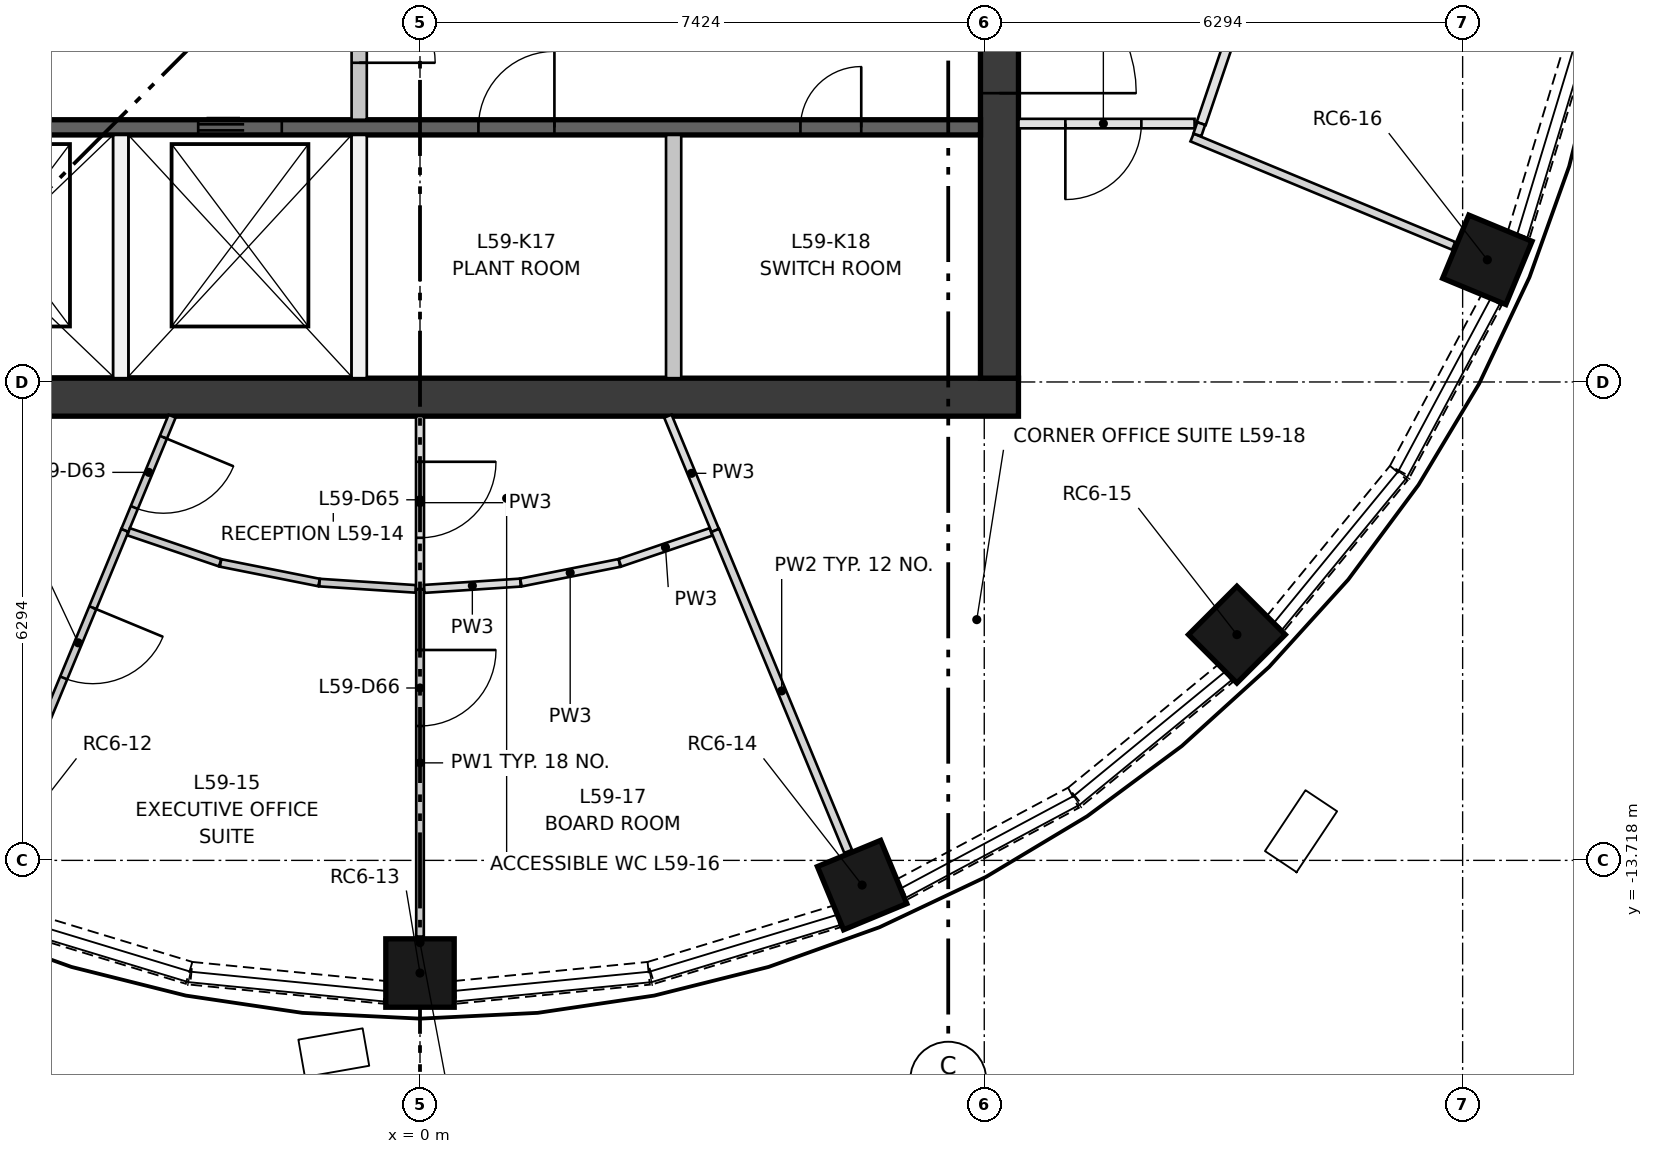
"""IFC4 building model, lengths in metres.
Left out: names, types, materials, properties, quantities, classifications, styles, units other than length and angle.
Written with IfcOpenShell. Run it as: python <this file> out.ifc"""

import sys

from ifc_helpers import new_model, si_unit, direction, frame, frame_2d, origin, origin_2d, place, context, subcontext, project, spatial, rectangle, extrude, element, fill, save


model = new_model("IFC4")
c1 = context("Model", 3, precision=1e-05, world=origin(), true_north=direction((0.0, 1.0)))
c2 = subcontext(c1, "Body", "Model", "MODEL_VIEW")
j1 = project(units=[si_unit("LENGTHUNIT", "METRE"), si_unit("PLANEANGLEUNIT", "RADIAN")], contexts=[c1])
p1 = place(None, origin())
s1 = spatial("IfcSite", under=j1, at=p1, CompositionType="ELEMENT")
p2 = place(p1, origin())
s2 = spatial("IfcBuilding", under=s1, at=p2, CompositionType="ELEMENT")
p3 = place(p2, frame((0.0, 0.0, 217.8)))
s3 = spatial("IfcBuildingStorey", under=s2, at=p3, CompositionType="ELEMENT", Elevation=217.8)
for number, where, z_axis, x_axis in (
    (1, (0.0, -15.2, 0.5), (0.0, 0.0, 1.0), (0.0, -1.0, 0.0)),
    (2, (5.817, -14.043, 0.5), (0.0, 0.0, 1.0), (0.383, -0.924, 0.0)),
    (3, (10.748, -10.748, 0.5), (0.0, 0.0, 1.0), (0.707, -0.707, 0.0)),
    (4, (14.043, -5.817, 0.5), (0.0, 0.0, 1.0), (0.924, -0.383, 0.0)),
):
    element("IfcColumn", number, at=place(p3, frame(where, z_axis=z_axis, x_axis=x_axis)), inside=s3, PredefinedType="COLUMN", context=c2, shape_type="SweptSolid", body=[
        extrude(rectangle(XDim=0.9, YDim=0.9, at=origin_2d()), origin(), (0.0, 0.0, 1.0), 2.85),
    ])
p4 = place(p3, frame((-7.874, -7.624, 0.0), z_axis=(0.0, 0.0, 1.0), x_axis=(1.0, 0.0, 0.0)))
e5 = element("IfcWall", 5, at=p4, inside=s3, PredefinedType="SHEAR", context=c2, shape_type="SweptSolid", body=[
    extrude(rectangle(XDim=15.748, YDim=0.5, at=frame_2d((7.874, 0.0))), origin(), (0.0, 0.0, 1.0), 3.35),
])
p5 = place(p3, frame((7.624, -7.374, 0.0), z_axis=(0.0, 0.0, 1.0), x_axis=(0.0, 1.0, 0.0)))
e6 = element("IfcWall", 6, at=p5, inside=s3, PredefinedType="SHEAR", context=c2, shape_type="SweptSolid", body=[
    extrude(rectangle(XDim=14.748, YDim=0.5, at=frame_2d((7.374, 0.0))), origin(), (0.0, 0.0, 1.0), 3.35),
])
p6 = place(p5, frame((6.874, 0.0, 0.0)))
e7 = element("IfcOpeningElement", 7, at=p6, cuts=e6, PredefinedType="OPENING", context=c2, shape_type="SweptSolid", body=[
    extrude(rectangle(XDim=1.0, YDim=2.1, at=frame_2d((0.5, 1.05))), frame((0.0, 0.26, 0.0), z_axis=(0.0, -1.0, 0.0), x_axis=(1.0, 0.0, 0.0)), (0.0, 0.0, 1.0), 0.52),
])
p7 = place(p5, frame((3.75, 0.0, 0.0)))
e8 = element("IfcOpeningElement", 8, at=p7, cuts=e6, PredefinedType="OPENING", context=c2, shape_type="SweptSolid", body=[
    extrude(rectangle(XDim=1.8, YDim=2.1, at=frame_2d((0.9, 1.05))), frame((0.0, 0.26, 0.0), z_axis=(0.0, -1.0, 0.0), x_axis=(1.0, 0.0, 0.0)), (0.0, 0.0, 1.0), 0.52),
])
p8 = place(p5, frame((9.198, 0.0, 0.0)))
e9 = element("IfcOpeningElement", 9, at=p8, cuts=e6, PredefinedType="OPENING", context=c2, shape_type="SweptSolid", body=[
    extrude(rectangle(XDim=1.8, YDim=2.1, at=frame_2d((0.9, 1.05))), frame((0.0, 0.26, 0.0), z_axis=(0.0, -1.0, 0.0), x_axis=(1.0, 0.0, 0.0)), (0.0, 0.0, 1.0), 0.52),
])
p9 = place(p3, frame((-7.374, -4.074, 0.0), z_axis=(0.0, 0.0, 1.0), x_axis=(1.0, 0.0, 0.0)))
e10 = element("IfcWall", 10, at=p9, inside=s3, PredefinedType="SHEAR", context=c2, shape_type="SweptSolid", body=[
    extrude(rectangle(XDim=14.748, YDim=0.2, at=frame_2d((7.374, 0.0))), origin(), (0.0, 0.0, 1.0), 3.0),
])
p10 = place(p9, frame((1.319, 0.0, 0.0)))
e11 = element("IfcOpeningElement", 11, at=p10, cuts=e10, PredefinedType="OPENING", context=c2, shape_type="SweptSolid", body=[
    extrude(rectangle(XDim=1.1, YDim=2.1, at=frame_2d((0.55, 1.05))), frame((0.0, 0.11, 0.0), z_axis=(0.0, -1.0, 0.0), x_axis=(1.0, 0.0, 0.0)), (0.0, 0.0, 1.0), 0.22),
])
p11 = place(p9, frame((4.456, 0.0, 0.0)))
e12 = element("IfcOpeningElement", 12, at=p11, cuts=e10, PredefinedType="OPENING", context=c2, shape_type="SweptSolid", body=[
    extrude(rectangle(XDim=1.1, YDim=2.1, at=frame_2d((0.55, 1.05))), frame((0.0, 0.11, 0.0), z_axis=(0.0, -1.0, 0.0), x_axis=(1.0, 0.0, 0.0)), (0.0, 0.0, 1.0), 0.22),
])
p12 = place(p9, frame((8.143, 0.0, 0.0)))
e13 = element("IfcOpeningElement", 13, at=p12, cuts=e10, PredefinedType="OPENING", context=c2, shape_type="SweptSolid", body=[
    extrude(rectangle(XDim=1.0, YDim=2.1, at=frame_2d((0.5, 1.05))), frame((0.0, 0.11, 0.0), z_axis=(0.0, -1.0, 0.0), x_axis=(1.0, 0.0, 0.0)), (0.0, 0.0, 1.0), 0.22),
])
p13 = place(p9, frame((12.379, 0.0, 0.0)))
e14 = element("IfcOpeningElement", 14, at=p13, cuts=e10, PredefinedType="OPENING", context=c2, shape_type="SweptSolid", body=[
    extrude(rectangle(XDim=0.8, YDim=2.1, at=frame_2d((0.4, 1.05))), frame((0.0, 0.11, 0.0), z_axis=(0.0, -1.0, 0.0), x_axis=(1.0, 0.0, 0.0)), (0.0, 0.0, 1.0), 0.22),
])
for number, where, z_axis, x_axis in (
    (15, (-3.937, -7.374, 0.0), (0.0, 0.0, 1.0), (0.0, 1.0, 0.0)),
    (16, (-0.8, -7.374, 0.0), (0.0, 0.0, 1.0), (0.0, 1.0, 0.0)),
):
    element("IfcWall", number, at=place(p3, frame(where, z_axis=z_axis, x_axis=x_axis)), inside=s3, PredefinedType="PARTITIONING", context=c2, shape_type="SweptSolid", body=[
        extrude(rectangle(XDim=3.2, YDim=0.2, at=frame_2d((1.6, 0.0))), origin(), (0.0, 0.0, 1.0), 3.0),
    ])
p14 = place(p3, frame((-0.8, -3.974, 0.0), z_axis=(0.0, 0.0, 1.0), x_axis=(0.0, 1.0, 0.0)))
e17 = element("IfcWall", 17, at=p14, inside=s3, PredefinedType="PARTITIONING", context=c2, shape_type="SweptSolid", body=[
    extrude(rectangle(XDim=2.499, YDim=0.2, at=frame_2d((1.25, 0.0))), origin(), (0.0, 0.0, 1.0), 3.0),
])
p15 = place(p14, frame((0.75, 0.0, 0.0)))
e18 = element("IfcOpeningElement", 18, at=p15, cuts=e17, PredefinedType="OPENING", context=c2, shape_type="SweptSolid", body=[
    extrude(rectangle(XDim=1.0, YDim=2.1, at=frame_2d((0.5, 1.05))), frame((0.0, 0.11, 0.0), z_axis=(0.0, -1.0, 0.0), x_axis=(1.0, 0.0, 0.0)), (0.0, 0.0, 1.0), 0.22),
])
p16 = place(p3, frame((3.337, -7.374, 0.0), z_axis=(0.0, 0.0, 1.0), x_axis=(0.0, 1.0, 0.0)))
e19 = element("IfcWall", 19, at=p16, inside=s3, PredefinedType="PARTITIONING", context=c2, shape_type="SweptSolid", body=[
    extrude(rectangle(XDim=3.2, YDim=0.2, at=frame_2d((1.6, 0.0))), origin(), (0.0, 0.0, 1.0), 3.0),
])
p17 = place(p3, frame((-5.486, -14.455, 0.0), z_axis=(0.0, 0.0, 1.0), x_axis=(0.956960147557, -0.290219358397, 0.0)))
e20 = element("IfcWall", 20, at=p17, inside=s3, PredefinedType="SOLIDWALL", context=c2, shape_type="SweptSolid", body=[
    extrude(rectangle(XDim=2.557, YDim=0.3, at=frame_2d((1.279, 0.0))), origin(), (0.0, 0.0, 1.0), 0.9),
])
for number, where, z_axis, x_axis in (
    (21, (-3.009, -15.204, 0.0), (0.0, 0.0, 1.0), (0.995, -0.098, 0.0)),
    (22, (0.464, -15.455, 0.0), (0.0, 0.0, 1.0), (0.995, 0.098, 0.0)),
):
    element("IfcWall", number, at=place(p3, frame(where, z_axis=z_axis, x_axis=x_axis)), inside=s3, PredefinedType="SOLIDWALL", context=c2, shape_type="SweptSolid", body=[
        extrude(rectangle(XDim=2.558, YDim=0.3, at=frame_2d((1.279, 0.0))), origin(), (0.0, 0.0, 1.0), 0.9),
    ])
p18 = place(p3, frame((3.038, -15.198, 0.0), z_axis=(0.0, 0.0, 1.0), x_axis=(0.956960147557, 0.290219358397, 0.0)))
e23 = element("IfcWall", 23, at=p18, inside=s3, PredefinedType="SOLIDWALL", context=c2, shape_type="SweptSolid", body=[
    extrude(rectangle(XDim=2.557, YDim=0.3, at=frame_2d((1.279, 0.0))), origin(), (0.0, 0.0, 1.0), 0.9),
])
p19 = place(p3, frame((6.343, -14.1, 0.0), z_axis=(0.0, 0.0, 1.0), x_axis=(0.881810499649, 0.471603904468, 0.0)))
e24 = element("IfcWall", 24, at=p19, inside=s3, PredefinedType="SOLIDWALL", context=c2, shape_type="SweptSolid", body=[
    extrude(rectangle(XDim=2.557, YDim=0.3, at=frame_2d((1.278, 0.0))), origin(), (0.0, 0.0, 1.0), 0.9),
])
for number, where, z_axis, x_axis in (
    (25, (8.623, -12.877, 0.0), (0.0, 0.0, 1.0), (0.773, 0.634, 0.0)),
    (26, (11.256, -10.6, 0.0), (0.0, 0.0, 1.0), (0.634, 0.773, 0.0)),
):
    element("IfcWall", number, at=place(p3, frame(where, z_axis=z_axis, x_axis=x_axis)), inside=s3, PredefinedType="SOLIDWALL", context=c2, shape_type="SweptSolid", body=[
        extrude(rectangle(XDim=2.558, YDim=0.3, at=frame_2d((1.279, 0.0))), origin(), (0.0, 0.0, 1.0), 0.9),
    ])
p20 = place(p3, frame((12.894, -8.598, 0.0), z_axis=(0.0, 0.0, 1.0), x_axis=(0.471603904468, 0.881810499649, 0.0)))
e27 = element("IfcWall", 27, at=p20, inside=s3, PredefinedType="SOLIDWALL", context=c2, shape_type="SweptSolid", body=[
    extrude(rectangle(XDim=2.557, YDim=0.3, at=frame_2d((1.278, 0.0))), origin(), (0.0, 0.0, 1.0), 0.9),
])
p21 = place(p3, frame((14.455, -5.486, 0.0), z_axis=(0.0, 0.0, 1.0), x_axis=(0.290219358397, 0.956960147557, 0.0)))
e28 = element("IfcWall", 28, at=p21, inside=s3, PredefinedType="SOLIDWALL", context=c2, shape_type="SweptSolid", body=[
    extrude(rectangle(XDim=2.557, YDim=0.3, at=frame_2d((1.279, 0.0))), origin(), (0.0, 0.0, 1.0), 0.9),
])
p22 = place(p3, frame((10.191, -4.024, 0.0), z_axis=(0.0, 0.0, 1.0), x_axis=(-1.0, 0.0, 0.0)))
e29 = element("IfcWall", 29, at=p22, inside=s3, PredefinedType="PARTITIONING", context=c2, shape_type="SweptSolid", body=[
    extrude(rectangle(XDim=2.317, YDim=0.125, at=frame_2d((1.158, 0.0))), origin(), (0.0, 0.0, 1.0), 3.0),
])
p23 = place(p22, frame((0.7, 0.0, 0.0)))
e30 = element("IfcOpeningElement", 30, at=p23, cuts=e29, PredefinedType="OPENING", context=c2, shape_type="SweptSolid", body=[
    extrude(rectangle(XDim=1.0, YDim=2.1, at=frame_2d((0.5, 1.05))), frame((0.0, 0.073, 0.0), z_axis=(0.0, -1.0, 0.0), x_axis=(1.0, 0.0, 0.0)), (0.0, 0.0, 1.0), 0.145),
])
p24 = place(p3, frame((10.672, -2.864, 0.0), z_axis=(0.0, 0.0, 1.0), x_axis=(-0.321363343769, -0.946955965862, 0.0)))
e31 = element("IfcWall", 31, at=p24, inside=s3, PredefinedType="PARTITIONING", context=c2, shape_type="SweptSolid", body=[
    extrude(rectangle(XDim=1.225, YDim=0.125, at=frame_2d((0.613, 0.0))), origin(), (0.0, 0.0, 1.0), 3.0),
])
p25 = place(p3, frame((-3.261, -7.874, 0.0), z_axis=(0.0, 0.0, 1.0), x_axis=(-0.382718376354, -0.923865057463, 0.0)))
e32 = element("IfcWall", 32, at=p25, inside=s3, PredefinedType="PARTITIONING", context=c2, shape_type="SweptSolid", body=[
    extrude(rectangle(XDim=1.627, YDim=0.1, at=frame_2d((0.813, 0.0))), origin(), (0.0, 0.0, 1.0), 3.0),
])
p26 = place(p25, frame((0.3, 0.0, 0.0)))
e33 = element("IfcOpeningElement", 33, at=p26, cuts=e32, PredefinedType="OPENING", context=c2, shape_type="SweptSolid", body=[
    extrude(rectangle(XDim=1.0, YDim=2.1, at=frame_2d((0.5, 1.05))), frame((0.0, 0.06, 0.0), z_axis=(0.0, -1.0, 0.0), x_axis=(1.0, 0.0, 0.0)), (0.0, 0.0, 1.0), 0.12),
])
p27 = place(p3, frame((-3.884, -9.377, 0.0), z_axis=(0.0, 0.0, 1.0), x_axis=(-0.382664766489, -0.923887263949, 0.0)))
e34 = element("IfcWall", 34, at=p27, inside=s3, PredefinedType="PARTITIONING", context=c2, shape_type="SweptSolid", body=[
    extrude(rectangle(XDim=4.57, YDim=0.1, at=frame_2d((2.285, 0.0))), origin(), (0.0, 0.0, 1.0), 3.0),
])
p28 = place(p27, frame((1.1, 0.0, 0.0)))
e35 = element("IfcOpeningElement", 35, at=p28, cuts=e34, PredefinedType="OPENING", context=c2, shape_type="SweptSolid", body=[
    extrude(rectangle(XDim=1.0, YDim=2.1, at=frame_2d((0.5, 1.05))), frame((0.0, 0.06, 0.0), z_axis=(0.0, -1.0, 0.0), x_axis=(1.0, 0.0, 0.0)), (0.0, 0.0, 1.0), 0.12),
])
p29 = place(p3, frame((-2.63, -9.803, 0.0), z_axis=(0.0, 0.0, 1.0), x_axis=(-0.946940072487, 0.321410172706, 0.0)))
e36 = element("IfcWall", 36, at=p29, inside=s3, PredefinedType="PARTITIONING", context=c2, shape_type="SweptSolid", body=[
    extrude(rectangle(XDim=1.271, YDim=0.1, at=frame_2d((0.635, 0.0))), origin(), (0.0, 0.0, 1.0), 3.0),
])
p30 = place(p3, frame((-1.328, -10.062, 0.0), z_axis=(0.0, 0.0, 1.0), x_axis=(-0.980779158075, 0.195121098517, 0.0)))
e37 = element("IfcWall", 37, at=p30, inside=s3, PredefinedType="PARTITIONING", context=c2, shape_type="SweptSolid", body=[
    extrude(rectangle(XDim=1.321, YDim=0.1, at=frame_2d((0.661, 0.0))), origin(), (0.0, 0.0, 1.0), 3.0),
])
p31 = place(p3, frame((-0.056, -10.146, 0.0), z_axis=(0.0, 0.0, 1.0), x_axis=(-0.997868677089, 0.065254143814, 0.0)))
e38 = element("IfcWall", 38, at=p31, inside=s3, PredefinedType="PARTITIONING", context=c2, shape_type="SweptSolid", body=[
    extrude(rectangle(XDim=1.268, YDim=0.1, at=frame_2d((0.634, 0.0))), origin(), (0.0, 0.0, 1.0), 3.0),
])
p32 = place(p3, frame((0.0, -7.874, 0.0), z_axis=(0.0, 0.0, 1.0), x_axis=(0.0, -1.0, 0.0)))
e39 = element("IfcWall", 39, at=p32, inside=s3, PredefinedType="PARTITIONING", context=c2, shape_type="SweptSolid", body=[
    extrude(rectangle(XDim=2.276, YDim=0.105, at=frame_2d((1.138, 0.0))), origin(), (0.0, 0.0, 1.0), 3.0),
])
p33 = place(p32, frame((0.6, 0.0, 0.0)))
e40 = element("IfcOpeningElement", 40, at=p33, cuts=e39, PredefinedType="OPENING", context=c2, shape_type="SweptSolid", body=[
    extrude(rectangle(XDim=1.0, YDim=2.1, at=frame_2d((0.5, 1.05))), frame((0.0, 0.062, 0.0), z_axis=(0.0, -1.0, 0.0), x_axis=(1.0, 0.0, 0.0)), (0.0, 0.0, 1.0), 0.125),
])
p34 = place(p3, frame((0.0, -10.15, 0.0), z_axis=(0.0, 0.0, 1.0), x_axis=(0.0, -1.0, 0.0)))
e41 = element("IfcWall", 41, at=p34, inside=s3, PredefinedType="PARTITIONING", context=c2, shape_type="SweptSolid", body=[
    extrude(rectangle(XDim=4.57, YDim=0.1, at=frame_2d((2.285, 0.0))), origin(), (0.0, 0.0, 1.0), 3.0),
])
p35 = place(p34, frame((0.8, 0.0, 0.0)))
e42 = element("IfcOpeningElement", 42, at=p35, cuts=e41, PredefinedType="OPENING", context=c2, shape_type="SweptSolid", body=[
    extrude(rectangle(XDim=1.0, YDim=2.1, at=frame_2d((0.5, 1.05))), frame((0.0, 0.06, 0.0), z_axis=(0.0, -1.0, 0.0), x_axis=(1.0, 0.0, 0.0)), (0.0, 0.0, 1.0), 0.12),
])
p36 = place(p3, frame((1.321, -10.063, 0.0), z_axis=(0.0, 0.0, 1.0), x_axis=(-0.99786785721, -0.065266680223, 0.0)))
e43 = element("IfcWall", 43, at=p36, inside=s3, PredefinedType="PARTITIONING", context=c2, shape_type="SweptSolid", body=[
    extrude(rectangle(XDim=1.268, YDim=0.105, at=frame_2d((0.634, 0.0))), origin(), (0.0, 0.0, 1.0), 3.0),
])
p37 = place(p3, frame((2.624, -9.805, 0.0), z_axis=(0.0, 0.0, 1.0), x_axis=(-0.980765080918, -0.195191844223, 0.0)))
e44 = element("IfcWall", 44, at=p37, inside=s3, PredefinedType="PARTITIONING", context=c2, shape_type="SweptSolid", body=[
    extrude(rectangle(XDim=1.321, YDim=0.105, at=frame_2d((0.66, 0.0))), origin(), (0.0, 0.0, 1.0), 3.0),
])
p38 = place(p3, frame((3.829, -9.396, 0.0), z_axis=(0.0, 0.0, 1.0), x_axis=(-0.946932566751, -0.321432285291, 0.0)))
e45 = element("IfcWall", 45, at=p38, inside=s3, PredefinedType="PARTITIONING", context=c2, shape_type="SweptSolid", body=[
    extrude(rectangle(XDim=1.265, YDim=0.105, at=frame_2d((0.633, 0.0))), origin(), (0.0, 0.0, 1.0), 3.0),
])
p39 = place(p3, frame((3.261, -7.874, 0.0), z_axis=(0.0, 0.0, 1.0), x_axis=(0.382718376354, -0.923865057463, 0.0)))
e46 = element("IfcWall", 46, at=p39, inside=s3, PredefinedType="PARTITIONING", context=c2, shape_type="SweptSolid", body=[
    extrude(rectangle(XDim=1.627, YDim=0.105, at=frame_2d((0.813, 0.0))), origin(), (0.0, 0.0, 1.0), 3.0),
])
p40 = place(p3, frame((3.884, -9.377, 0.0), z_axis=(0.0, 0.0, 1.0), x_axis=(0.382664766489, -0.923887263949, 0.0)))
e47 = element("IfcWall", 47, at=p40, inside=s3, PredefinedType="PARTITIONING", context=c2, shape_type="SweptSolid", body=[
    extrude(rectangle(XDim=4.57, YDim=0.11, at=frame_2d((2.285, 0.0))), origin(), (0.0, 0.0, 1.0), 3.0),
])
p41 = place(p3, frame((10.158, -4.208, 0.0), z_axis=(0.0, 0.0, 1.0), x_axis=(0.923897012701, -0.382641228728, 0.0)))
e48 = element("IfcWall", 48, at=p41, inside=s3, PredefinedType="PARTITIONING", context=c2, shape_type="SweptSolid", body=[
    extrude(rectangle(XDim=3.725, YDim=0.11, at=frame_2d((1.862, 0.0))), origin(), (0.0, 0.0, 1.0), 3.0),
])
p42 = place(p3, frame((10.278, -4.024, 0.0), z_axis=(0.0, 0.0, 1.0), x_axis=(-0.321819116975, -0.94680117023, 0.0)))
e49 = element("IfcWall", 49, at=p42, inside=s3, PredefinedType="PARTITIONING", context=c2, shape_type="SweptSolid", body=[
    extrude(rectangle(XDim=0.157, YDim=0.11, at=frame_2d((0.079, 0.0))), origin(), (0.0, 0.0, 1.0), 3.0),
])
p43 = place(p11, origin())
e50 = element("IfcDoor", 50, at=p43, inside=s3, OperationType="DOUBLE_DOOR_SLIDING", PredefinedType="DOOR", context=c2, shape_type="SweptSolid", body=[
    extrude(rectangle(XDim=1.1, YDim=2.1, at=frame_2d((0.55, 1.05))), frame((0.0, 0.025, 0.0), z_axis=(0.0, -1.0, 0.0), x_axis=(1.0, 0.0, 0.0)), (0.0, 0.0, 1.0), 0.05),
])
fill(e12, e50)
p44 = place(p15, frame((1.0, 0.0, 0.0), z_axis=(0.0, 0.0, 1.0), x_axis=(-1.0, 0.0, 0.0)))
e51 = element("IfcDoor", 51, at=p44, inside=s3, OperationType="SINGLE_SWING_LEFT", PredefinedType="DOOR", context=c2, shape_type="SweptSolid", body=[
    extrude(rectangle(XDim=1.0, YDim=2.1, at=frame_2d((0.5, 1.05))), frame((0.0, 0.025, 0.0), z_axis=(0.0, -1.0, 0.0), x_axis=(1.0, 0.0, 0.0)), (0.0, 0.0, 1.0), 0.05),
])
fill(e18, e51)
p45 = place(p12, origin())
e52 = element("IfcDoor", 52, at=p45, inside=s3, OperationType="SINGLE_SWING_RIGHT", PredefinedType="DOOR", context=c2, shape_type="SweptSolid", body=[
    extrude(rectangle(XDim=1.0, YDim=2.1, at=frame_2d((0.5, 1.05))), frame((0.0, 0.025, 0.0), z_axis=(0.0, -1.0, 0.0), x_axis=(1.0, 0.0, 0.0)), (0.0, 0.0, 1.0), 0.05),
])
fill(e13, e52)
p46 = place(p13, origin())
e53 = element("IfcDoor", 53, at=p46, inside=s3, OperationType="SINGLE_SWING_RIGHT", PredefinedType="DOOR", context=c2, shape_type="SweptSolid", body=[
    extrude(rectangle(XDim=0.8, YDim=2.1, at=frame_2d((0.4, 1.05))), frame((0.0, 0.025, 0.0), z_axis=(0.0, -1.0, 0.0), x_axis=(1.0, 0.0, 0.0)), (0.0, 0.0, 1.0), 0.05),
])
fill(e14, e53)
p47 = place(p7, frame((1.8, 0.0, 0.0), z_axis=(0.0, 0.0, 1.0), x_axis=(-1.0, 0.0, 0.0)))
e54 = element("IfcDoor", 54, at=p47, inside=s3, OperationType="DOUBLE_DOOR_SINGLE_SWING", PredefinedType="DOOR", context=c2, shape_type="SweptSolid", body=[
    extrude(rectangle(XDim=1.8, YDim=2.1, at=frame_2d((0.9, 1.05))), frame((0.0, 0.025, 0.0), z_axis=(0.0, -1.0, 0.0), x_axis=(1.0, 0.0, 0.0)), (0.0, 0.0, 1.0), 0.05),
])
fill(e8, e54)
p48 = place(p23, origin())
e55 = element("IfcDoor", 55, at=p48, inside=s3, OperationType="SINGLE_SWING_RIGHT", PredefinedType="DOOR", context=c2, shape_type="SweptSolid", body=[
    extrude(rectangle(XDim=1.0, YDim=2.1, at=frame_2d((0.5, 1.05))), frame((0.0, 0.025, 0.0), z_axis=(0.0, -1.0, 0.0), x_axis=(1.0, 0.0, 0.0)), (0.0, 0.0, 1.0), 0.05),
])
fill(e30, e55)
p49 = place(p26, origin())
e56 = element("IfcDoor", 56, at=p49, inside=s3, OperationType="SINGLE_SWING_LEFT", PredefinedType="DOOR", context=c2, shape_type="SweptSolid", body=[
    extrude(rectangle(XDim=1.0, YDim=2.1, at=frame_2d((0.5, 1.05))), frame((0.0, 0.025, 0.0), z_axis=(0.0, -1.0, 0.0), x_axis=(1.0, 0.0, 0.0)), (0.0, 0.0, 1.0), 0.05),
])
fill(e33, e56)
p50 = place(p28, origin())
e57 = element("IfcDoor", 57, at=p50, inside=s3, OperationType="SINGLE_SWING_LEFT", PredefinedType="DOOR", context=c2, shape_type="SweptSolid", body=[
    extrude(rectangle(XDim=1.0, YDim=2.1, at=frame_2d((0.5, 1.05))), frame((0.0, 0.025, 0.0), z_axis=(0.0, -1.0, 0.0), x_axis=(1.0, 0.0, 0.0)), (0.0, 0.0, 1.0), 0.05),
])
fill(e35, e57)
p51 = place(p33, origin())
e58 = element("IfcDoor", 58, at=p51, inside=s3, OperationType="SINGLE_SWING_LEFT", PredefinedType="DOOR", context=c2, shape_type="SweptSolid", body=[
    extrude(rectangle(XDim=1.0, YDim=2.1, at=frame_2d((0.5, 1.05))), frame((0.0, 0.025, 0.0), z_axis=(0.0, -1.0, 0.0), x_axis=(1.0, 0.0, 0.0)), (0.0, 0.0, 1.0), 0.05),
])
fill(e40, e58)
p52 = place(p35, origin())
e59 = element("IfcDoor", 59, at=p52, inside=s3, OperationType="SINGLE_SWING_LEFT", PredefinedType="DOOR", context=c2, shape_type="SweptSolid", body=[
    extrude(rectangle(XDim=1.0, YDim=2.1, at=frame_2d((0.5, 1.05))), frame((0.0, 0.025, 0.0), z_axis=(0.0, -1.0, 0.0), x_axis=(1.0, 0.0, 0.0)), (0.0, 0.0, 1.0), 0.05),
])
fill(e42, e59)
save(model, sys.argv[1])
